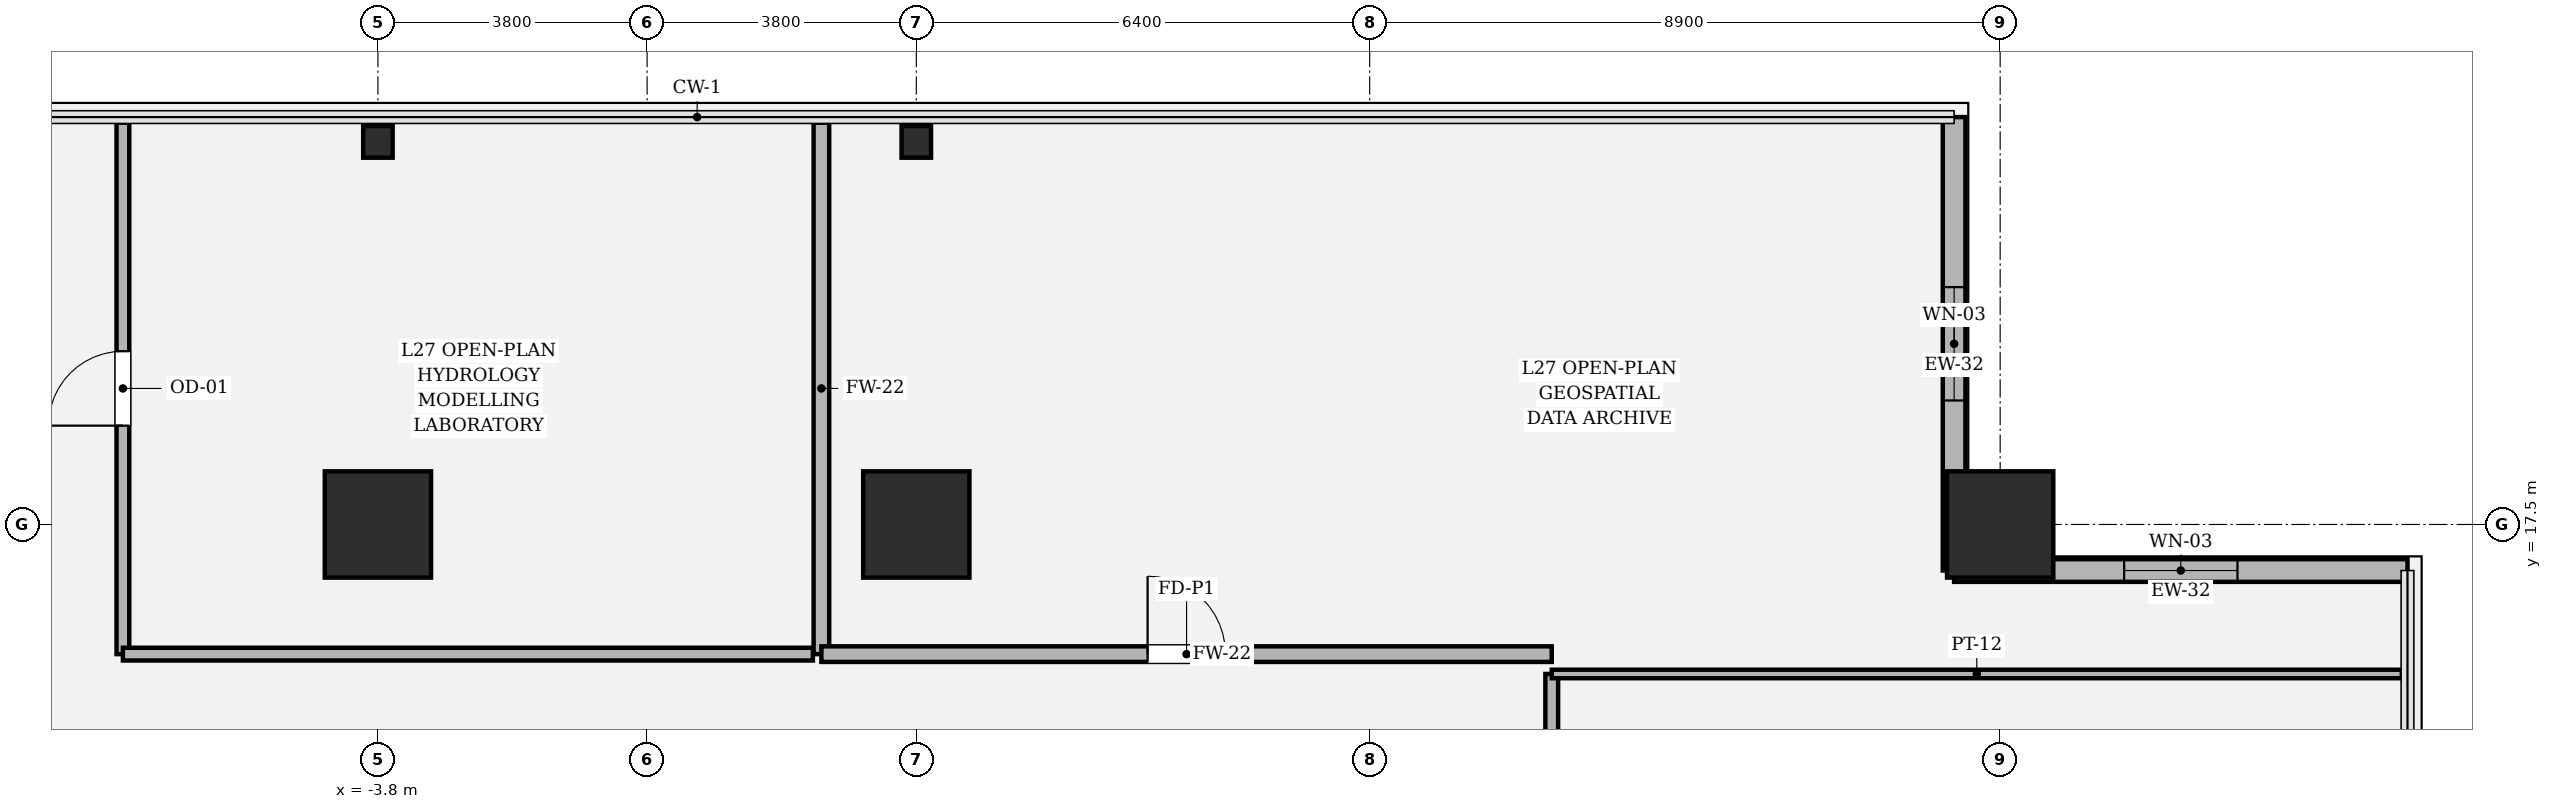
"""IFC4 building model, lengths in metres.
Left out: names, types, materials, properties, quantities, classifications, styles, units other than length and angle.
Written with IfcOpenShell. Run it as: python <this file> out.ifc"""

import sys

from ifc_helpers import new_model, si_unit, direction, frame, frame_2d, origin, origin_2d, place, context, subcontext, project, spatial, rectangle, hollow_rectangle, i_section, extrude, element, fill, save


model = new_model("IFC4")
c1 = context("Model", 3, precision=1e-05, world=origin(), true_north=direction((0.0, 1.0)))
c2 = subcontext(c1, "Body", "Model", "MODEL_VIEW")
j1 = project(units=[si_unit("LENGTHUNIT", "METRE"), si_unit("PLANEANGLEUNIT", "RADIAN")], contexts=[c1])
p1 = place(None, origin())
s1 = spatial("IfcSite", under=j1, at=p1, CompositionType="ELEMENT")
p2 = place(p1, origin())
s2 = spatial("IfcBuilding", under=s1, at=p2, CompositionType="ELEMENT")
p3 = place(p2, frame((0.0, 0.0, 117.3)))
s3 = spatial("IfcBuildingStorey", under=s2, at=p3, CompositionType="ELEMENT", Elevation=117.3)
for number, where, z_axis, x_axis in (
    (1, (19.1, 17.5, 0.0), (0.0, 0.0, 1.0), (1.0, 0.0, 0.0)),
    (2, (3.8, 17.5, 0.0), (0.0, 0.0, 1.0), (1.0, 0.0, 0.0)),
    (3, (-3.8, 17.5, 0.0), (0.0, 0.0, 1.0), (1.0, 0.0, 0.0)),
):
    element("IfcColumn", number, at=place(p3, frame(where, z_axis=z_axis, x_axis=x_axis)), inside=s3, PredefinedType="COLUMN", context=c2, shape_type="SweptSolid", body=[
        extrude(hollow_rectangle(XDim=1.5, YDim=1.5, WallThickness=0.045, at=origin_2d()), origin(), (0.0, 0.0, 1.0), 4.05),
    ])
for number, where, z_axis, x_axis in (
    (4, (-3.8, 22.9, 0.0), (0.0, 0.0, 1.0), (1.0, 0.0, 0.0)),
    (5, (3.8, 22.9, 0.0), (0.0, 0.0, 1.0), (1.0, 0.0, 0.0)),
):
    element("IfcColumn", number, at=place(p3, frame(where, z_axis=z_axis, x_axis=x_axis)), inside=s3, PredefinedType="COLUMN", context=c2, shape_type="SweptSolid", body=[
        extrude(i_section(OverallWidth=0.416, OverallDepth=0.446, WebThickness=0.039, FlangeThickness=0.062, FilletRadius=0.018, at=origin_2d()), origin(), (0.0, 0.0, 1.0), 4.048),
    ])
p4 = place(p3, frame((24.85, 16.85, 0.0), z_axis=(0.0, 0.0, 1.0), x_axis=(-1.0, 0.0, 0.0)))
e6 = element("IfcWall", 6, at=p4, inside=s3, PredefinedType="SOLIDWALL", context=c2, shape_type="SweptSolid", body=[
    extrude(rectangle(XDim=6.4, YDim=0.32, at=frame_2d((3.2, 0.0))), origin(), (0.0, 0.0, 1.0), 3.104),
])
p5 = place(p4, frame((2.4, 0.0, 0.464)))
e7 = element("IfcOpeningElement", 7, at=p5, cuts=e6, PredefinedType="OPENING", context=c2, shape_type="SweptSolid", body=[
    extrude(rectangle(XDim=1.6, YDim=2.4, at=frame_2d((0.8, 1.2))), frame((0.0, 0.17, 0.0), z_axis=(0.0, -1.0, 0.0), x_axis=(1.0, 0.0, 0.0)), (0.0, 0.0, 1.0), 0.34),
])
p6 = place(p3, frame((18.45, 16.85, 0.0), z_axis=(0.0, 0.0, 1.0), x_axis=(0.0, 1.0, 0.0)))
e8 = element("IfcWall", 8, at=p6, inside=s3, PredefinedType="SOLIDWALL", context=c2, shape_type="SweptSolid", body=[
    extrude(rectangle(XDim=6.4, YDim=0.32, at=frame_2d((3.2, 0.0))), origin(), (0.0, 0.0, 1.0), 3.104),
])
p7 = place(p6, frame((2.4, 0.0, 0.464)))
e9 = element("IfcOpeningElement", 9, at=p7, cuts=e8, PredefinedType="OPENING", context=c2, shape_type="SweptSolid", body=[
    extrude(rectangle(XDim=1.6, YDim=2.4, at=frame_2d((0.8, 1.2))), frame((0.0, 0.17, 0.0), z_axis=(0.0, -1.0, 0.0), x_axis=(1.0, 0.0, 0.0)), (0.0, 0.0, 1.0), 0.34),
])
p8 = place(p3, frame((12.77, 13.38, 0.0), z_axis=(0.0, 0.0, 1.0), x_axis=(0.0, 1.0, 0.0)))
e10 = element("IfcWall", 10, at=p8, inside=s3, PredefinedType="PARTITIONING", context=c2, shape_type="SweptSolid", body=[
    extrude(rectangle(XDim=2.01, YDim=0.18, at=frame_2d((1.005, 0.0))), origin(), (0.0, 0.0, 1.0), 3.354),
])
p9 = place(p3, frame((12.77, 15.39, 0.0), z_axis=(0.0, 0.0, 1.0), x_axis=(1.0, 0.0, 0.0)))
e11 = element("IfcWall", 11, at=p9, inside=s3, PredefinedType="PARTITIONING", context=c2, shape_type="SweptSolid", body=[
    extrude(rectangle(XDim=12.0, YDim=0.12, at=frame_2d((6.0, 0.0))), origin(), (0.0, 0.0, 1.0), 3.104),
])
p10 = place(p3, frame((2.46, 15.67, 0.0), z_axis=(0.0, 0.0, 1.0), x_axis=(0.0, 1.0, 0.0)))
e12 = element("IfcWall", 12, at=p10, inside=s3, PredefinedType="SOLIDWALL", context=c2, shape_type="SweptSolid", body=[
    extrude(rectangle(XDim=7.5, YDim=0.22, at=frame_2d((3.75, 0.0))), origin(), (0.0, 0.0, 1.0), 2.524),
])
p11 = place(p3, frame((12.77, 15.67, 0.0), z_axis=(0.0, 0.0, 1.0), x_axis=(-1.0, 0.0, 0.0)))
e13 = element("IfcWall", 13, at=p11, inside=s3, PredefinedType="SOLIDWALL", context=c2, shape_type="SweptSolid", body=[
    extrude(rectangle(XDim=10.31, YDim=0.22, at=frame_2d((5.155, 0.0))), origin(), (0.0, 0.0, 1.0), 3.104),
])
p12 = place(p11, frame((4.605, 0.0, 0.0)))
e14 = element("IfcOpeningElement", 14, at=p12, cuts=e13, PredefinedType="OPENING", context=c2, shape_type="SweptSolid", body=[
    extrude(rectangle(XDim=1.1, YDim=2.2, at=frame_2d((0.55, 1.1))), frame((0.0, 0.12, 0.0), z_axis=(0.0, -1.0, 0.0), x_axis=(1.0, 0.0, 0.0)), (0.0, 0.0, 1.0), 0.24),
])
p13 = place(p3, frame((-7.4, 15.67, 0.0), z_axis=(0.0, 0.0, 1.0), x_axis=(0.0, 1.0, 0.0)))
e15 = element("IfcWall", 15, at=p13, inside=s3, PredefinedType="PARTITIONING", context=c2, shape_type="SweptSolid", body=[
    extrude(rectangle(XDim=7.5, YDim=0.18, at=frame_2d((3.75, 0.0))), origin(), (0.0, 0.0, 1.0), 2.524),
])
p14 = place(p13, frame((3.225, 0.0, 0.0)))
e16 = element("IfcOpeningElement", 16, at=p14, cuts=e15, PredefinedType="OPENING", context=c2, shape_type="SweptSolid", body=[
    extrude(rectangle(XDim=1.05, YDim=2.2, at=frame_2d((0.525, 1.1))), frame((0.0, 0.1, 0.0), z_axis=(0.0, -1.0, 0.0), x_axis=(1.0, 0.0, 0.0)), (0.0, 0.0, 1.0), 0.2),
])
p15 = place(p3, frame((2.34, 15.67, 0.0), z_axis=(0.0, 0.0, 1.0), x_axis=(-1.0, 0.0, 0.0)))
e17 = element("IfcWall", 17, at=p15, inside=s3, PredefinedType="PARTITIONING", context=c2, shape_type="SweptSolid", body=[
    extrude(rectangle(XDim=9.74, YDim=0.18, at=frame_2d((4.87, 0.0))), origin(), (0.0, 0.0, 1.0), 3.104),
])
p16 = place(p5, origin())
e18 = element("IfcWindow", 18, at=p16, inside=s3, PartitioningType="SINGLE_PANEL", PredefinedType="WINDOW", context=c2, shape_type="SweptSolid", body=[
    extrude(rectangle(XDim=1.6, YDim=2.4, at=frame_2d((0.8, 1.2))), frame((0.0, 0.03, 0.0), z_axis=(0.0, -1.0, 0.0), x_axis=(1.0, 0.0, 0.0)), (0.0, 0.0, 1.0), 0.06),
])
fill(e7, e18)
p17 = place(p7, origin())
e19 = element("IfcWindow", 19, at=p17, inside=s3, PartitioningType="SINGLE_PANEL", PredefinedType="WINDOW", context=c2, shape_type="SweptSolid", body=[
    extrude(rectangle(XDim=1.6, YDim=2.4, at=frame_2d((0.8, 1.2))), frame((0.0, 0.03, 0.0), z_axis=(0.0, -1.0, 0.0), x_axis=(1.0, 0.0, 0.0)), (0.0, 0.0, 1.0), 0.06),
])
fill(e9, e19)
p18 = place(p12, origin())
e20 = element("IfcDoor", 20, at=p18, inside=s3, OperationType="SINGLE_SWING_RIGHT", PredefinedType="DOOR", context=c2, shape_type="SweptSolid", body=[
    extrude(rectangle(XDim=1.1, YDim=2.2, at=frame_2d((0.55, 1.1))), frame((0.0, 0.025, 0.0), z_axis=(0.0, -1.0, 0.0), x_axis=(1.0, 0.0, 0.0)), (0.0, 0.0, 1.0), 0.05),
])
fill(e14, e20)
p19 = place(p14, origin())
e21 = element("IfcDoor", 21, at=p19, inside=s3, OperationType="SINGLE_SWING_LEFT", PredefinedType="DOOR", context=c2, shape_type="SweptSolid", body=[
    extrude(rectangle(XDim=1.05, YDim=2.2, at=frame_2d((0.525, 1.1))), frame((0.0, 0.025, 0.0), z_axis=(0.0, -1.0, 0.0), x_axis=(1.0, 0.0, 0.0)), (0.0, 0.0, 1.0), 0.05),
])
fill(e16, e21)
save(model, sys.argv[1])
